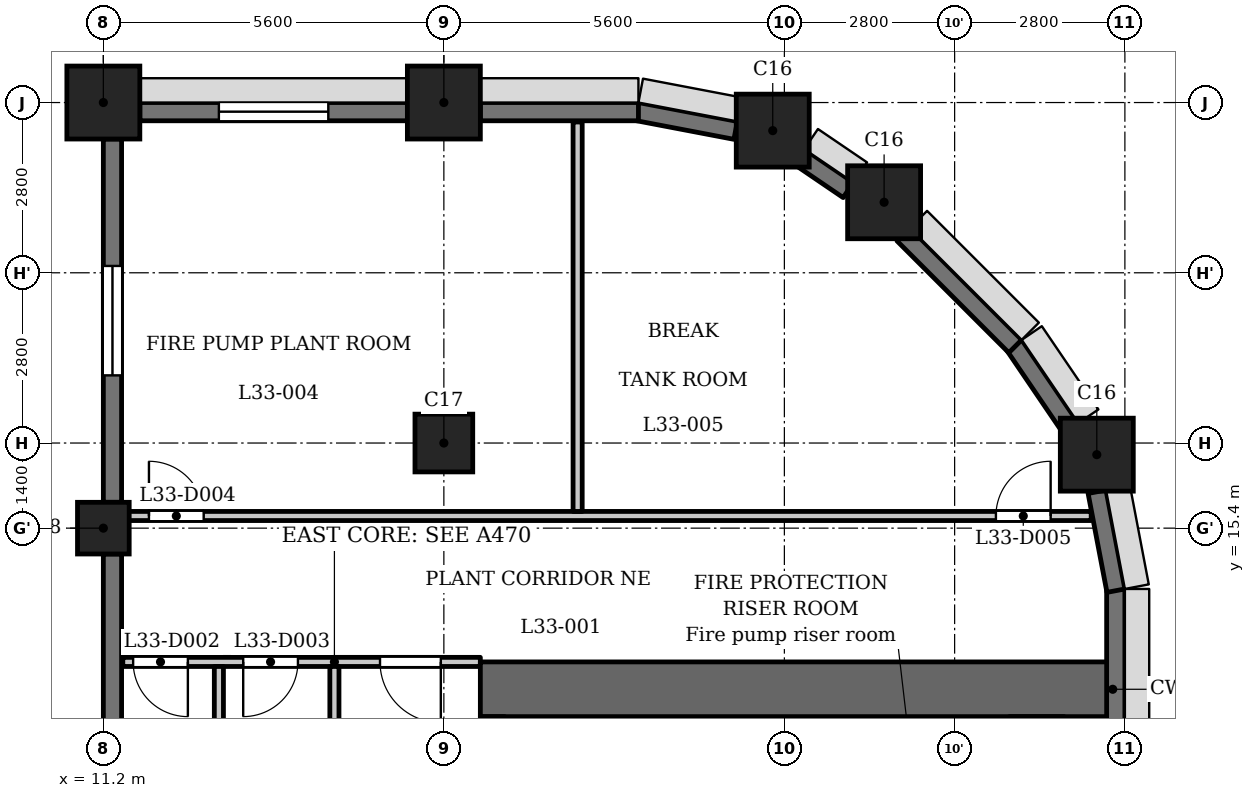
"""IFC4 building model, lengths in metres.
Left out: names, types, materials, properties, quantities, classifications, styles, units other than length and angle.
Written with IfcOpenShell. Run it as: python <this file> out.ifc"""

import sys

from ifc_helpers import new_model, si_unit, direction, frame, frame_2d, origin, origin_2d, place, context, subcontext, project, spatial, rectangle, extrude, element, fill, save


model = new_model("IFC4")
c1 = context("Model", 3, precision=1e-05, world=origin(), true_north=direction((0.0, 1.0)))
c2 = subcontext(c1, "Body", "Model", "MODEL_VIEW")
j1 = project(units=[si_unit("LENGTHUNIT", "METRE"), si_unit("PLANEANGLEUNIT", "RADIAN")], contexts=[c1])
p1 = place(None, origin())
s1 = spatial("IfcSite", under=j1, at=p1, CompositionType="ELEMENT")
p2 = place(p1, origin())
s2 = spatial("IfcBuilding", under=s1, at=p2, CompositionType="ELEMENT")
p3 = place(p2, frame((0.0, 0.0, 130.7)))
s3 = spatial("IfcBuildingStorey", under=s2, at=p3, CompositionType="ELEMENT", Elevation=130.7)
for number, where, z_axis, x_axis in (
    (1, (27.538, 16.609, 0.0), (0.0, 0.0, 1.0), (1.0, 0.0, 0.0)),
    (2, (24.04, 20.76, 0.0), (0.0, 0.0, 1.0), (1.0, 0.0, 0.0)),
    (3, (22.209, 21.938, 0.0), (0.0, 0.0, 1.0), (1.0, 0.0, 0.0)),
    (4, (16.8, 22.4, 0.0), (0.0, 0.0, 1.0), (1.0, 0.0, 0.0)),
    (5, (11.2, 22.4, 0.0), (0.0, 0.0, 1.0), (1.0, 0.0, 0.0)),
):
    element("IfcColumn", number, at=place(p3, frame(where, z_axis=z_axis, x_axis=x_axis)), inside=s3, PredefinedType="COLUMN", context=c2, shape_type="SweptSolid", body=[
        extrude(rectangle(XDim=1.2, YDim=1.2, at=origin_2d()), origin(), (0.0, 0.0, 1.0), 5.4),
    ])
p4 = place(p3, frame((16.8, 16.8, 0.0), z_axis=(0.0, 0.0, 1.0), x_axis=(1.0, 0.0, 0.0)))
e6 = element("IfcColumn", 6, at=p4, inside=s3, PredefinedType="COLUMN", context=c2, shape_type="SweptSolid", body=[
    extrude(rectangle(XDim=0.95, YDim=0.95, at=origin_2d()), origin(), (0.0, 0.0, 1.0), 5.4),
])
p5 = place(p3, frame((11.2, 15.4, 0.0), z_axis=(0.0, 0.0, 1.0), x_axis=(1.0, 0.0, 0.0)))
e7 = element("IfcColumn", 7, at=p5, inside=s3, PredefinedType="COLUMN", context=c2, shape_type="SweptSolid", body=[
    extrude(rectangle(XDim=0.85, YDim=0.85, at=origin_2d()), origin(), (0.0, 0.0, 1.0), 5.4),
])
p6 = place(p3, frame((27.85, 11.8, 0.0), z_axis=(0.0, 0.0, 1.0), x_axis=(0.0, 1.0, 0.0)))
e8 = element("IfcWall", 8, at=p6, inside=s3, PredefinedType="SOLIDWALL", context=c2, shape_type="SweptSolid", body=[
    extrude(rectangle(XDim=2.6, YDim=0.3, at=frame_2d((1.3, 0.0))), origin(), (0.0, 0.0, 1.0), 4.3),
])
for number, where, z_axis, x_axis in (
    (9, (27.853, 14.372, 0.0), (0.0, 0.0, 1.0), (-0.187, 0.982, 0.0)),
    (10, (27.11, 17.043, 0.0), (0.0, 0.0, 1.0), (-0.562, 0.827, 0.0)),
):
    element("IfcWall", number, at=place(p3, frame(where, z_axis=z_axis, x_axis=x_axis)), inside=s3, PredefinedType="SOLIDWALL", context=c2, shape_type="SweptSolid", body=[
        extrude(rectangle(XDim=1.656, YDim=0.3, at=frame_2d((0.828, 0.0))), origin(), (0.0, 0.0, 1.0), 4.3),
    ])
p7 = place(p3, frame((26.197, 18.391, 0.0), z_axis=(0.0, 0.0, 1.0), x_axis=(-0.707059830104, 0.707153729152, 0.0)))
e11 = element("IfcWall", 11, at=p7, inside=s3, PredefinedType="SOLIDWALL", context=c2, shape_type="SweptSolid", body=[
    extrude(rectangle(XDim=2.6, YDim=0.3, at=frame_2d((1.3, 0.0))), origin(), (0.0, 0.0, 1.0), 4.3),
])
p8 = place(p3, frame((23.451, 20.96, 0.0), z_axis=(0.0, 0.0, 1.0), x_axis=(-0.827019434577, 0.562173331661, 0.0)))
e12 = element("IfcWall", 12, at=p8, inside=s3, PredefinedType="SOLIDWALL", context=c2, shape_type="SweptSolid", body=[
    extrude(rectangle(XDim=0.977, YDim=0.3, at=frame_2d((0.489, 0.0))), origin(), (0.0, 0.0, 1.0), 5.1),
])
p9 = place(p3, frame((21.599, 21.942, 0.0), z_axis=(0.0, 0.0, 1.0), x_axis=(-0.98228820662, 0.187376303559, 0.0)))
e13 = element("IfcWall", 13, at=p9, inside=s3, PredefinedType="SOLIDWALL", context=c2, shape_type="SweptSolid", body=[
    extrude(rectangle(XDim=1.656, YDim=0.3, at=frame_2d((0.828, 0.0))), origin(), (0.0, 0.0, 1.0), 4.3),
])
p10 = place(p3, frame((20.0, 22.25, 0.0), z_axis=(0.0, 0.0, 1.0), x_axis=(-1.0, 0.0, 0.0)))
e14 = element("IfcWall", 14, at=p10, inside=s3, PredefinedType="SOLIDWALL", context=c2, shape_type="SweptSolid", body=[
    extrude(rectangle(XDim=2.6, YDim=0.3, at=frame_2d((1.3, 0.0))), origin(), (0.0, 0.0, 1.0), 4.3),
])
p11 = place(p3, frame((16.2, 22.25, 0.0), z_axis=(0.0, 0.0, 1.0), x_axis=(-1.0, 0.0, 0.0)))
e15 = element("IfcWall", 15, at=p11, inside=s3, PredefinedType="SOLIDWALL", context=c2, shape_type="SweptSolid", body=[
    extrude(rectangle(XDim=4.4, YDim=0.3, at=frame_2d((2.2, 0.0))), origin(), (0.0, 0.0, 1.0), 4.3),
])
p12 = place(p11, frame((1.3, 0.0, 0.9)))
e16 = element("IfcOpeningElement", 16, at=p12, cuts=e15, PredefinedType="OPENING", context=c2, shape_type="SweptSolid", body=[
    extrude(rectangle(XDim=1.8, YDim=1.5, at=frame_2d((0.9, 0.75))), frame((0.0, 0.16, 0.0), z_axis=(0.0, -1.0, 0.0), x_axis=(1.0, 0.0, 0.0)), (0.0, 0.0, 1.0), 0.32),
])
p13 = place(p3, frame((11.35, 21.8, 0.0), z_axis=(0.0, 0.0, 1.0), x_axis=(0.0, -1.0, 0.0)))
e17 = element("IfcWall", 17, at=p13, inside=s3, PredefinedType="SOLIDWALL", context=c2, shape_type="SweptSolid", body=[
    extrude(rectangle(XDim=5.975, YDim=0.3, at=frame_2d((2.988, 0.0))), origin(), (0.0, 0.0, 1.0), 5.1),
])
p14 = place(p13, frame((2.087, 0.0, 0.9)))
e18 = element("IfcOpeningElement", 18, at=p14, cuts=e17, PredefinedType="OPENING", context=c2, shape_type="SweptSolid", body=[
    extrude(rectangle(XDim=1.8, YDim=1.5, at=frame_2d((0.9, 0.75))), frame((0.0, 0.16, 0.0), z_axis=(0.0, -1.0, 0.0), x_axis=(1.0, 0.0, 0.0)), (0.0, 0.0, 1.0), 0.32),
])
p15 = place(p3, frame((11.35, 14.975, 0.0), z_axis=(0.0, 0.0, 1.0), x_axis=(0.0, -1.0, 0.0)))
e19 = element("IfcWall", 19, at=p15, inside=s3, PredefinedType="SOLIDWALL", context=c2, shape_type="SweptSolid", body=[
    extrude(rectangle(XDim=6.1, YDim=0.3, at=frame_2d((3.05, 0.0))), origin(), (0.0, 0.0, 1.0), 5.1),
])
p16 = place(p15, frame((3.075, 0.0, 0.9)))
e20 = element("IfcOpeningElement", 20, at=p16, cuts=e19, PredefinedType="OPENING", context=c2, shape_type="SweptSolid", body=[
    extrude(rectangle(XDim=1.8, YDim=1.5, at=frame_2d((0.9, 0.75))), frame((0.0, 0.16, 0.0), z_axis=(0.0, -1.0, 0.0), x_axis=(1.0, 0.0, 0.0)), (0.0, 0.0, 1.0), 0.32),
])
p17 = place(p3, frame((17.4, 12.75, 0.0), z_axis=(0.0, 0.0, 1.0), x_axis=(1.0, 0.0, 0.0)))
e21 = element("IfcWall", 21, at=p17, inside=s3, PredefinedType="SHEAR", context=c2, shape_type="SweptSolid", body=[
    extrude(rectangle(XDim=10.4, YDim=0.9, at=frame_2d((5.2, 0.0))), origin(), (0.0, 0.0, 1.0), 5.1),
])
p18 = place(p3, frame((17.6, -12.3, 0.0), z_axis=(0.0, 0.0, 1.0), x_axis=(0.0, 1.0, 0.0)))
e22 = element("IfcWall", 22, at=p18, inside=s3, PredefinedType="SHEAR", context=c2, shape_type="SweptSolid", body=[
    extrude(rectangle(XDim=24.6, YDim=0.4, at=frame_2d((12.3, 0.0))), origin(), (0.0, 0.0, 1.0), 5.1),
])
p19 = place(p18, frame((15.45, 0.0, 0.0)))
e23 = element("IfcOpeningElement", 23, at=p19, cuts=e22, PredefinedType="OPENING", context=c2, shape_type="SweptSolid", body=[
    extrude(rectangle(XDim=1.1, YDim=2.1, at=frame_2d((0.55, 1.05))), frame((0.0, 0.21, 0.0), z_axis=(0.0, -1.0, 0.0), x_axis=(1.0, 0.0, 0.0)), (0.0, 0.0, 1.0), 0.42),
])
p20 = place(p18, frame((17.85, 0.0, 0.0)))
e24 = element("IfcOpeningElement", 24, at=p20, cuts=e22, PredefinedType="OPENING", context=c2, shape_type="SweptSolid", body=[
    extrude(rectangle(XDim=1.1, YDim=2.1, at=frame_2d((0.55, 1.05))), frame((0.0, 0.21, 0.0), z_axis=(0.0, -1.0, 0.0), x_axis=(1.0, 0.0, 0.0)), (0.0, 0.0, 1.0), 0.42),
])
p21 = place(p18, frame((22.8, 0.0, 0.0)))
e25 = element("IfcOpeningElement", 25, at=p21, cuts=e22, PredefinedType="OPENING", context=c2, shape_type="SweptSolid", body=[
    extrude(rectangle(XDim=1.1, YDim=2.1, at=frame_2d((0.55, 1.05))), frame((0.0, 0.21, 0.0), z_axis=(0.0, -1.0, 0.0), x_axis=(1.0, 0.0, 0.0)), (0.0, 0.0, 1.0), 0.42),
])
p22 = place(p18, frame((0.7, 0.0, 0.0)))
e26 = element("IfcOpeningElement", 26, at=p22, cuts=e22, PredefinedType="OPENING", context=c2, shape_type="SweptSolid", body=[
    extrude(rectangle(XDim=1.1, YDim=2.1, at=frame_2d((0.55, 1.05))), frame((0.0, 0.21, 0.0), z_axis=(0.0, -1.0, 0.0), x_axis=(1.0, 0.0, 0.0)), (0.0, 0.0, 1.0), 0.42),
])
p23 = place(p18, frame((12.775, 0.0, 0.0)))
e27 = element("IfcOpeningElement", 27, at=p23, cuts=e22, PredefinedType="OPENING", context=c2, shape_type="SweptSolid", body=[
    extrude(rectangle(XDim=1.8, YDim=2.1, at=frame_2d((0.9, 1.05))), frame((0.0, 0.21, 0.0), z_axis=(0.0, -1.0, 0.0), x_axis=(1.0, 0.0, 0.0)), (0.0, 0.0, 1.0), 0.42),
])
p24 = place(p3, frame((26.55, -12.3, 0.0), z_axis=(0.0, 0.0, 1.0), x_axis=(0.0, 1.0, 0.0)))
e28 = element("IfcWall", 28, at=p24, inside=s3, PredefinedType="SHEAR", context=c2, shape_type="SweptSolid", body=[
    extrude(rectangle(XDim=24.6, YDim=0.9, at=frame_2d((12.3, 0.0))), origin(), (0.0, 0.0, 1.0), 5.1),
])
p25 = place(p3, frame((23.55, 9.8, 0.0), z_axis=(0.0, 0.0, 1.0), x_axis=(0.0, 1.0, 0.0)))
e29 = element("IfcWall", 29, at=p25, inside=s3, PredefinedType="PARTITIONING", context=c2, shape_type="SweptSolid", body=[
    extrude(rectangle(XDim=2.5, YDim=0.2, at=frame_2d((1.25, 0.0))), origin(), (0.0, 0.0, 1.0), 5.1),
])
p26 = place(p25, frame((0.8, 0.0, 0.0)))
e30 = element("IfcOpeningElement", 30, at=p26, cuts=e29, PredefinedType="OPENING", context=c2, shape_type="SweptSolid", body=[
    extrude(rectangle(XDim=0.9, YDim=2.1, at=frame_2d((0.45, 1.05))), frame((0.0, 0.11, 0.0), z_axis=(0.0, -1.0, 0.0), x_axis=(1.0, 0.0, 0.0)), (0.0, 0.0, 1.0), 0.22),
])
p27 = place(p3, frame((11.52, 13.2, 0.0), z_axis=(0.0, 0.0, 1.0), x_axis=(1.0, 0.0, 0.0)))
e31 = element("IfcWall", 31, at=p27, inside=s3, PredefinedType="PARTITIONING", context=c2, shape_type="SweptSolid", body=[
    extrude(rectangle(XDim=5.88, YDim=0.15, at=frame_2d((2.94, 0.0))), origin(), (0.0, 0.0, 1.0), 5.1),
])
p28 = place(p27, frame((4.23, 0.0, 0.0)))
e32 = element("IfcOpeningElement", 32, at=p28, cuts=e31, PredefinedType="OPENING", context=c2, shape_type="SweptSolid", body=[
    extrude(rectangle(XDim=1.0, YDim=2.1, at=frame_2d((0.5, 1.05))), frame((0.0, 0.085, 0.0), z_axis=(0.0, -1.0, 0.0), x_axis=(1.0, 0.0, 0.0)), (0.0, 0.0, 1.0), 0.17),
])
p29 = place(p27, frame((0.17, 0.0, 0.0)))
e33 = element("IfcOpeningElement", 33, at=p29, cuts=e31, PredefinedType="OPENING", context=c2, shape_type="SweptSolid", body=[
    extrude(rectangle(XDim=0.9, YDim=2.1, at=frame_2d((0.45, 1.05))), frame((0.0, 0.085, 0.0), z_axis=(0.0, -1.0, 0.0), x_axis=(1.0, 0.0, 0.0)), (0.0, 0.0, 1.0), 0.17),
])
p30 = place(p27, frame((1.98, 0.0, 0.0)))
e34 = element("IfcOpeningElement", 34, at=p30, cuts=e31, PredefinedType="OPENING", context=c2, shape_type="SweptSolid", body=[
    extrude(rectangle(XDim=0.9, YDim=2.1, at=frame_2d((0.45, 1.05))), frame((0.0, 0.085, 0.0), z_axis=(0.0, -1.0, 0.0), x_axis=(1.0, 0.0, 0.0)), (0.0, 0.0, 1.0), 0.17),
])
p31 = place(p3, frame((11.29, 15.6, 0.0), z_axis=(0.0, 0.0, 1.0), x_axis=(1.0, 0.0, 0.0)))
e35 = element("IfcWall", 35, at=p31, inside=s3, PredefinedType="PARTITIONING", context=c2, shape_type="SweptSolid", body=[
    extrude(rectangle(XDim=16.156, YDim=0.15, at=frame_2d((8.078, 0.0))), origin(), (0.0, 0.0, 1.0), 5.1),
])
p32 = place(p31, frame((0.66, 0.0, 0.0)))
e36 = element("IfcOpeningElement", 36, at=p32, cuts=e35, PredefinedType="OPENING", context=c2, shape_type="SweptSolid", body=[
    extrude(rectangle(XDim=0.9, YDim=2.1, at=frame_2d((0.45, 1.05))), frame((0.0, 0.085, 0.0), z_axis=(0.0, -1.0, 0.0), x_axis=(1.0, 0.0, 0.0)), (0.0, 0.0, 1.0), 0.17),
])
p33 = place(p31, frame((14.589, 0.0, 0.0)))
e37 = element("IfcOpeningElement", 37, at=p33, cuts=e35, PredefinedType="OPENING", context=c2, shape_type="SweptSolid", body=[
    extrude(rectangle(XDim=0.9, YDim=2.1, at=frame_2d((0.45, 1.05))), frame((0.0, 0.085, 0.0), z_axis=(0.0, -1.0, 0.0), x_axis=(1.0, 0.0, 0.0)), (0.0, 0.0, 1.0), 0.17),
])
p34 = place(p3, frame((13.1, 7.32, 0.0), z_axis=(0.0, 0.0, 1.0), x_axis=(0.0, 1.0, 0.0)))
e38 = element("IfcWall", 38, at=p34, inside=s3, PredefinedType="PARTITIONING", context=c2, shape_type="SweptSolid", body=[
    extrude(rectangle(XDim=5.805, YDim=0.15, at=frame_2d((2.902, 0.0))), origin(), (0.0, 0.0, 1.0), 5.1),
])
p35 = place(p3, frame((15.0, 6.769, 0.0), z_axis=(0.0, 0.0, 1.0), x_axis=(0.0, 1.0, 0.0)))
e39 = element("IfcWall", 39, at=p35, inside=s3, PredefinedType="PARTITIONING", context=c2, shape_type="SweptSolid", body=[
    extrude(rectangle(XDim=6.356, YDim=0.15, at=frame_2d((3.178, 0.0))), origin(), (0.0, 0.0, 1.0), 5.1),
])
p36 = place(p3, frame((19.0, 15.675, 0.0), z_axis=(0.0, 0.0, 1.0), x_axis=(0.0, 1.0, 0.0)))
e40 = element("IfcWall", 40, at=p36, inside=s3, PredefinedType="PARTITIONING", context=c2, shape_type="SweptSolid", body=[
    extrude(rectangle(XDim=6.405, YDim=0.15, at=frame_2d((3.203, 0.0))), origin(), (0.0, 0.0, 1.0), 5.1),
])
p37 = place(p28, origin())
e41 = element("IfcDoor", 41, at=p37, inside=s3, OperationType="SINGLE_SWING_RIGHT", PredefinedType="DOOR", context=c2, shape_type="SweptSolid", body=[
    extrude(rectangle(XDim=1.0, YDim=2.1, at=frame_2d((0.5, 1.05))), frame((0.0, 0.025, 0.0), z_axis=(0.0, -1.0, 0.0), x_axis=(1.0, 0.0, 0.0)), (0.0, 0.0, 1.0), 0.05),
])
fill(e32, e41)
p38 = place(p29, origin())
e42 = element("IfcDoor", 42, at=p38, inside=s3, OperationType="SINGLE_SWING_RIGHT", PredefinedType="DOOR", context=c2, shape_type="SweptSolid", body=[
    extrude(rectangle(XDim=0.9, YDim=2.1, at=frame_2d((0.45, 1.05))), frame((0.0, 0.025, 0.0), z_axis=(0.0, -1.0, 0.0), x_axis=(1.0, 0.0, 0.0)), (0.0, 0.0, 1.0), 0.05),
])
fill(e33, e42)
p39 = place(p30, origin())
e43 = element("IfcDoor", 43, at=p39, inside=s3, OperationType="SINGLE_SWING_LEFT", PredefinedType="DOOR", context=c2, shape_type="SweptSolid", body=[
    extrude(rectangle(XDim=0.9, YDim=2.1, at=frame_2d((0.45, 1.05))), frame((0.0, 0.025, 0.0), z_axis=(0.0, -1.0, 0.0), x_axis=(1.0, 0.0, 0.0)), (0.0, 0.0, 1.0), 0.05),
])
fill(e34, e43)
p40 = place(p32, origin())
e44 = element("IfcDoor", 44, at=p40, inside=s3, OperationType="SINGLE_SWING_RIGHT", PredefinedType="DOOR", context=c2, shape_type="SweptSolid", body=[
    extrude(rectangle(XDim=0.9, YDim=2.1, at=frame_2d((0.45, 1.05))), frame((0.0, 0.025, 0.0), z_axis=(0.0, -1.0, 0.0), x_axis=(1.0, 0.0, 0.0)), (0.0, 0.0, 1.0), 0.05),
])
fill(e36, e44)
p41 = place(p33, origin())
e45 = element("IfcDoor", 45, at=p41, inside=s3, OperationType="SINGLE_SWING_LEFT", PredefinedType="DOOR", context=c2, shape_type="SweptSolid", body=[
    extrude(rectangle(XDim=0.9, YDim=2.1, at=frame_2d((0.45, 1.05))), frame((0.0, 0.025, 0.0), z_axis=(0.0, -1.0, 0.0), x_axis=(1.0, 0.0, 0.0)), (0.0, 0.0, 1.0), 0.05),
])
fill(e37, e45)
p42 = place(p12, origin())
e46 = element("IfcWindow", 46, at=p42, inside=s3, PartitioningType="SINGLE_PANEL", PredefinedType="WINDOW", context=c2, shape_type="SweptSolid", body=[
    extrude(rectangle(XDim=1.8, YDim=1.5, at=frame_2d((0.9, 0.75))), frame((0.0, 0.03, 0.0), z_axis=(0.0, -1.0, 0.0), x_axis=(1.0, 0.0, 0.0)), (0.0, 0.0, 1.0), 0.06),
])
fill(e16, e46)
p43 = place(p14, origin())
e47 = element("IfcWindow", 47, at=p43, inside=s3, PartitioningType="SINGLE_PANEL", PredefinedType="WINDOW", context=c2, shape_type="SweptSolid", body=[
    extrude(rectangle(XDim=1.8, YDim=1.5, at=frame_2d((0.9, 0.75))), frame((0.0, 0.03, 0.0), z_axis=(0.0, -1.0, 0.0), x_axis=(1.0, 0.0, 0.0)), (0.0, 0.0, 1.0), 0.06),
])
fill(e18, e47)
save(model, sys.argv[1])
